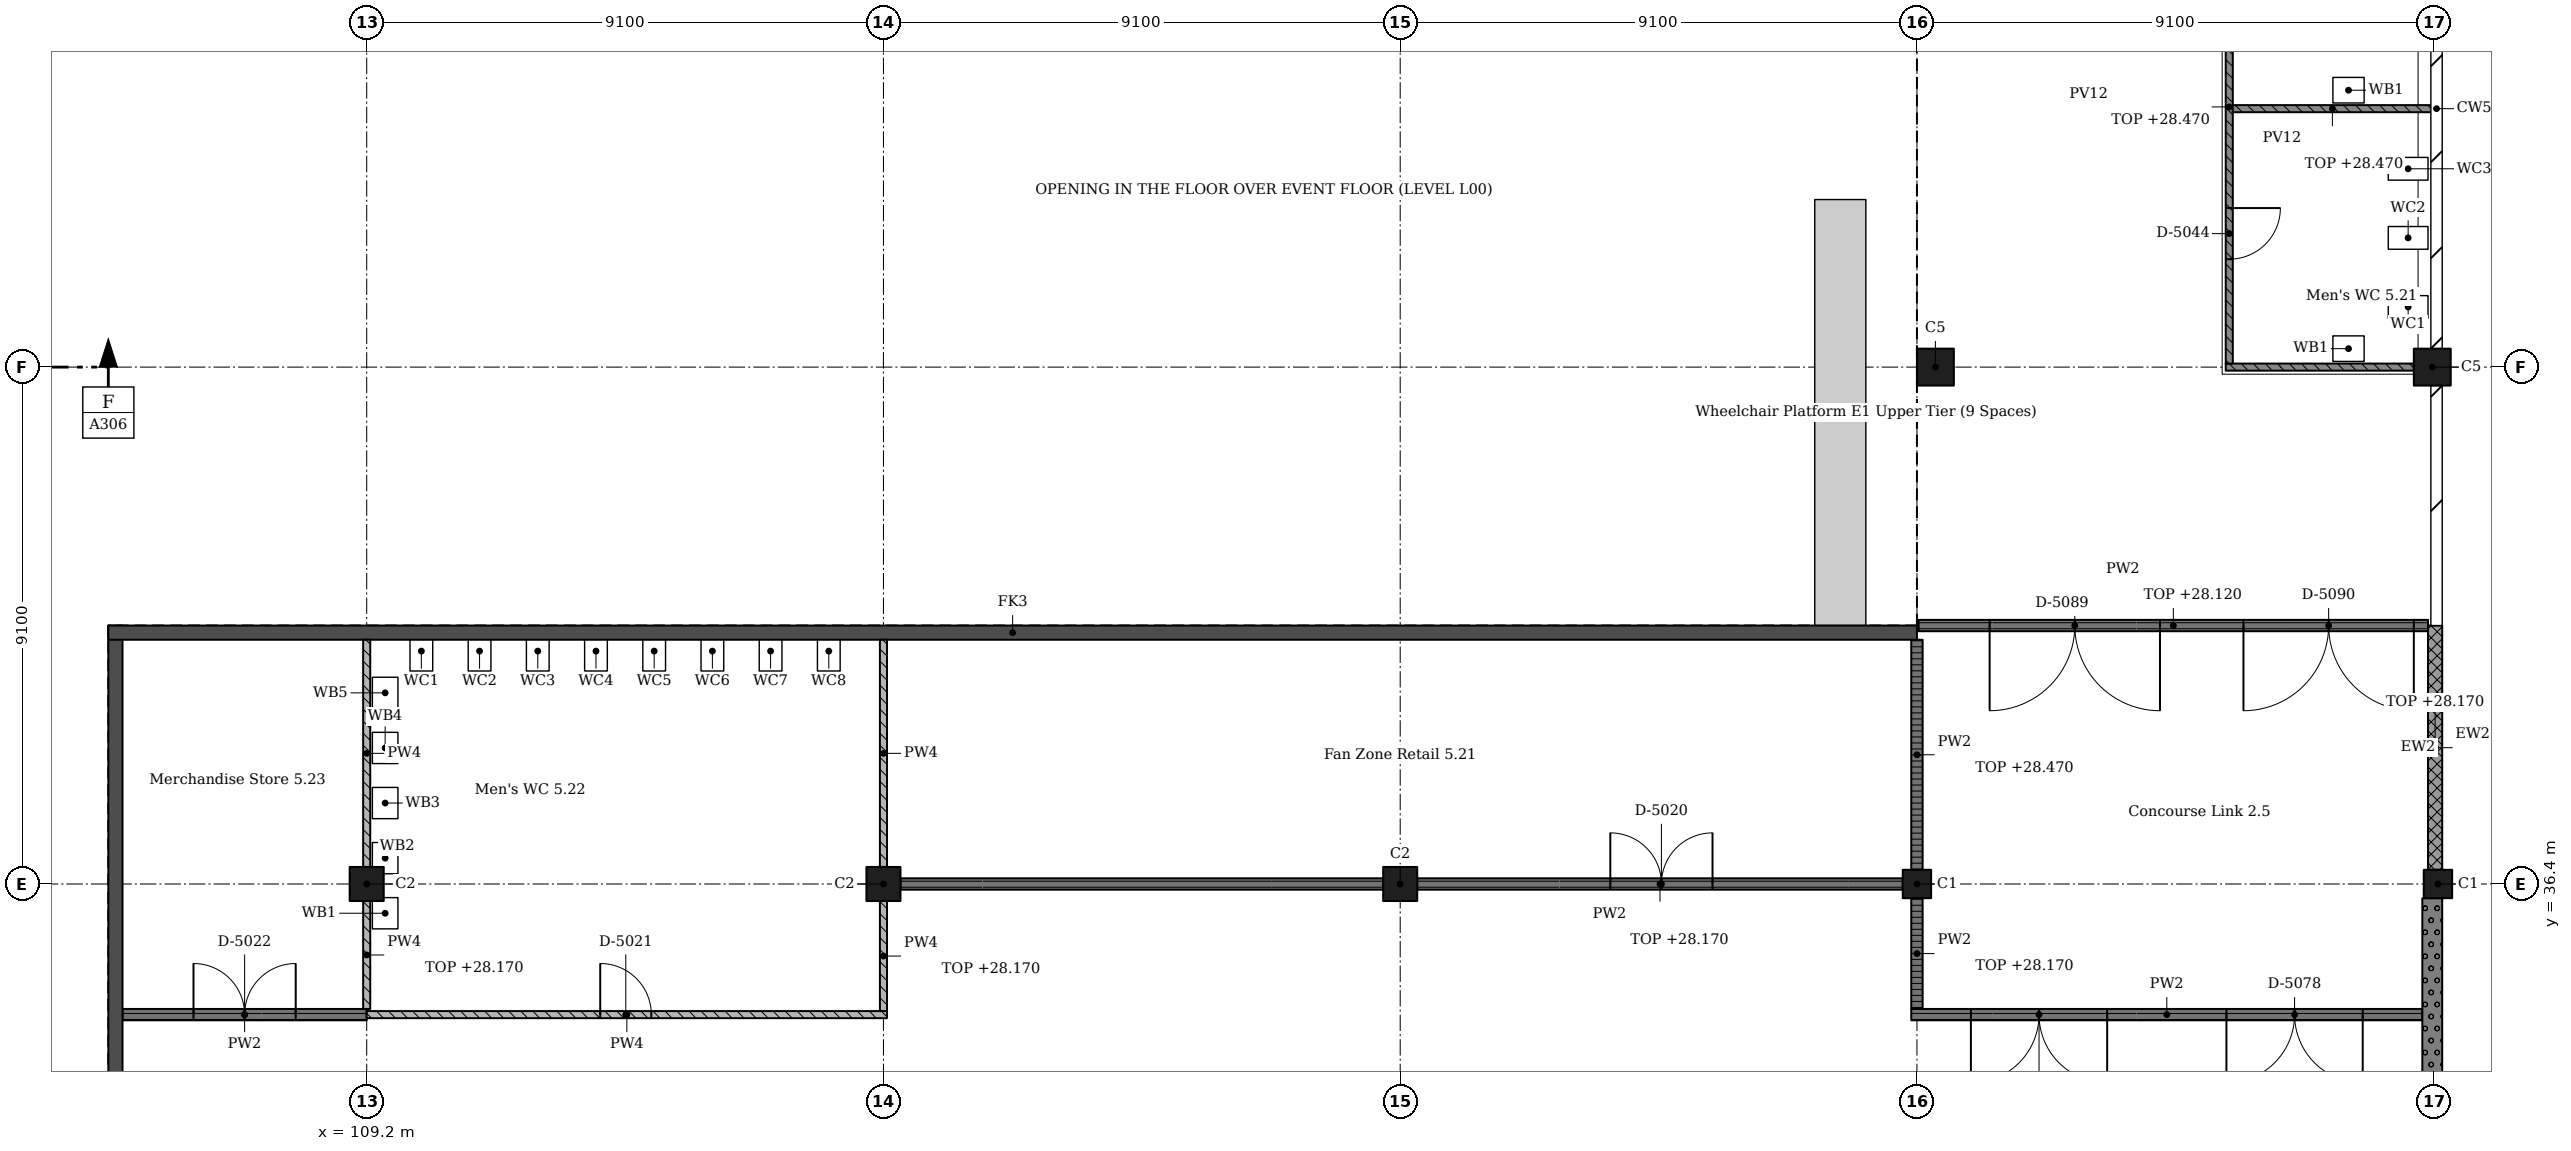
"""IFC4 building model, lengths in metres.
Left out: names, types, materials, properties, quantities, classifications, styles, units other than length and angle.
Written with IfcOpenShell. Run it as: python <this file> out.ifc"""

import sys

from ifc_helpers import new_model, si_unit, direction, frame, frame_2d, origin, origin_2d, place, context, subcontext, project, spatial, rectangle, extrude, element, fill, save


model = new_model("IFC4")
c1 = context("Model", 3, precision=1e-05, world=origin(), true_north=direction((0.0, 1.0)))
c2 = subcontext(c1, "Body", "Model", "MODEL_VIEW")
j1 = project(units=[si_unit("LENGTHUNIT", "METRE"), si_unit("PLANEANGLEUNIT", "RADIAN")], contexts=[c1])
p1 = place(None, origin())
s1 = spatial("IfcSite", under=j1, at=p1, CompositionType="ELEMENT")
p2 = place(p1, origin())
s2 = spatial("IfcBuilding", under=s1, at=p2, CompositionType="ELEMENT")
p3 = place(p2, frame((0.0, 0.0, 24.57)))
s3 = spatial("IfcBuildingStorey", under=s2, at=p3, CompositionType="ELEMENT", Elevation=24.57)
for number, where, z_axis, x_axis in (
    (1, (109.2, 36.4, 0.0), (0.0, 0.0, 1.0), (1.0, 0.0, 0.0)),
    (2, (118.3, 36.4, 0.0), (0.0, 0.0, 1.0), (1.0, 0.0, 0.0)),
    (3, (127.4, 36.4, 0.0), (0.0, 0.0, 1.0), (1.0, 0.0, 0.0)),
):
    element("IfcColumn", number, at=place(p3, frame(where, z_axis=z_axis, x_axis=x_axis)), inside=s3, PredefinedType="COLUMN", context=c2, shape_type="SweptSolid", body=[
        extrude(rectangle(XDim=0.6, YDim=0.6, at=origin_2d()), origin(), (0.0, 0.0, 1.0), 4.55),
    ])
p4 = place(p3, frame((136.5, 36.4, 0.0), z_axis=(0.0, 0.0, 1.0), x_axis=(1.0, 0.0, 0.0)))
e4 = element("IfcColumn", 4, at=p4, inside=s3, PredefinedType="COLUMN", context=c2, shape_type="SweptSolid", body=[
    extrude(rectangle(XDim=0.5, YDim=0.5, at=origin_2d()), origin(), (0.0, 0.0, 1.0), 4.55),
])
p5 = place(p3, frame((136.825, 45.5, 0.0), z_axis=(0.0, 0.0, 1.0), x_axis=(1.0, 0.0, 0.0)))
e5 = element("IfcColumn", 5, at=p5, inside=s3, PredefinedType="COLUMN", context=c2, shape_type="SweptSolid", body=[
    extrude(rectangle(XDim=0.65, YDim=0.65, at=origin_2d()), origin(), (0.0, 0.0, 1.0), 4.55),
])
p6 = place(p3, frame((145.675, 36.4, 0.0), z_axis=(0.0, 0.0, 1.0), x_axis=(1.0, 0.0, 0.0)))
e6 = element("IfcColumn", 6, at=p6, inside=s3, PredefinedType="COLUMN", context=c2, shape_type="SweptSolid", body=[
    extrude(rectangle(XDim=0.5, YDim=0.5, at=origin_2d()), origin(), (0.0, 0.0, 1.0), 4.55),
])
p7 = place(p3, frame((145.575, 45.5, 0.0), z_axis=(0.0, 0.0, 1.0), x_axis=(1.0, 0.0, 0.0)))
e7 = element("IfcColumn", 7, at=p7, inside=s3, PredefinedType="COLUMN", context=c2, shape_type="SweptSolid", body=[
    extrude(rectangle(XDim=0.65, YDim=0.65, at=origin_2d()), origin(), (0.0, 0.0, 1.0), 4.55),
])
p8 = place(p3, frame((104.775, 40.95, 0.0), z_axis=(0.0, 0.0, 1.0), x_axis=(0.0, -1.0, 0.0)))
e8 = element("IfcWall", 8, at=p8, inside=s3, PredefinedType="SHEAR", context=c2, shape_type="SweptSolid", body=[
    extrude(rectangle(XDim=31.85, YDim=0.25, at=frame_2d((15.925, 0.0))), origin(), (0.0, 0.0, 1.0), 4.55),
])
p9 = place(p3, frame((104.65, 40.825, 0.0), z_axis=(0.0, 0.0, 1.0), x_axis=(1.0, 0.0, 0.0)))
e9 = element("IfcWall", 9, at=p9, inside=s3, PredefinedType="SHEAR", context=c2, shape_type="SweptSolid", body=[
    extrude(rectangle(XDim=31.85, YDim=0.25, at=frame_2d((15.925, 0.0))), origin(), (0.0, 0.0, 1.0), 4.55),
])
p10 = place(p3, frame((145.575, 27.55, 0.0), z_axis=(0.0, 0.0, 1.0), x_axis=(0.0, 1.0, 0.0)))
e10 = element("IfcWall", 10, at=p10, inside=s3, PredefinedType="SOLIDWALL", context=c2, shape_type="SweptSolid", body=[
    extrude(rectangle(XDim=8.6, YDim=0.35, at=frame_2d((4.3, 0.0))), origin(), (0.0, 0.0, 1.0), 3.6),
])
p11 = place(p3, frame((145.625, 36.65, 0.0), z_axis=(0.0, 0.0, 1.0), x_axis=(0.0, 1.0, 0.0)))
e11 = element("IfcWall", 11, at=p11, inside=s3, PredefinedType="SOLIDWALL", context=c2, shape_type="SweptSolid", body=[
    extrude(rectangle(XDim=4.3, YDim=0.25, at=frame_2d((2.15, 0.0))), origin(), (0.0, 0.0, 1.0), 3.6),
])
p12 = place(p3, frame((109.2, 34.1, 0.0), z_axis=(0.0, 0.0, 1.0), x_axis=(-1.0, 0.0, 0.0)))
e12 = element("IfcWall", 12, at=p12, inside=s3, PredefinedType="PARTITIONING", context=c2, shape_type="SweptSolid", body=[
    extrude(rectangle(XDim=4.3, YDim=0.2, at=frame_2d((2.15, 0.0))), origin(), (0.0, 0.0, 1.0), 4.35),
])
p13 = place(p12, frame((1.25, 0.0, 0.0)))
e13 = element("IfcOpeningElement", 13, at=p13, cuts=e12, PredefinedType="OPENING", context=c2, shape_type="SweptSolid", body=[
    extrude(rectangle(XDim=1.8, YDim=2.1, at=frame_2d((0.9, 1.05))), frame((0.0, 0.11, 0.0), z_axis=(0.0, -1.0, 0.0), x_axis=(1.0, 0.0, 0.0)), (0.0, 0.0, 1.0), 0.22),
])
p14 = place(p3, frame((109.2, 34.2, 0.0), z_axis=(0.0, 0.0, 1.0), x_axis=(0.0, 1.0, 0.0)))
e14 = element("IfcWall", 14, at=p14, inside=s3, PredefinedType="PARTITIONING", context=c2, shape_type="SweptSolid", body=[
    extrude(rectangle(XDim=1.9, YDim=0.125, at=frame_2d((0.95, 0.0))), origin(), (0.0, 0.0, 1.0), 3.6),
])
p15 = place(p3, frame((109.2, 36.7, 0.0), z_axis=(0.0, 0.0, 1.0), x_axis=(0.0, 1.0, 0.0)))
e15 = element("IfcWall", 15, at=p15, inside=s3, PredefinedType="PARTITIONING", context=c2, shape_type="SweptSolid", body=[
    extrude(rectangle(XDim=4.0, YDim=0.125, at=frame_2d((2.0, 0.0))), origin(), (0.0, 0.0, 1.0), 4.35),
])
p16 = place(p3, frame((118.3, 36.1, 0.0), z_axis=(0.0, 0.0, 1.0), x_axis=(0.0, -1.0, 0.0)))
e16 = element("IfcWall", 16, at=p16, inside=s3, PredefinedType="PARTITIONING", context=c2, shape_type="SweptSolid", body=[
    extrude(rectangle(XDim=1.938, YDim=0.125, at=frame_2d((0.969, 0.0))), origin(), (0.0, 0.0, 1.0), 3.6),
])
p17 = place(p3, frame((118.3, 36.7, 0.0), z_axis=(0.0, 0.0, 1.0), x_axis=(0.0, 1.0, 0.0)))
e17 = element("IfcWall", 17, at=p17, inside=s3, PredefinedType="PARTITIONING", context=c2, shape_type="SweptSolid", body=[
    extrude(rectangle(XDim=4.0, YDim=0.125, at=frame_2d((2.0, 0.0))), origin(), (0.0, 0.0, 1.0), 4.35),
])
p18 = place(p3, frame((118.363, 34.1, 0.0), z_axis=(0.0, 0.0, 1.0), x_axis=(-1.0, 0.0, 0.0)))
e18 = element("IfcWall", 18, at=p18, inside=s3, PredefinedType="PARTITIONING", context=c2, shape_type="SweptSolid", body=[
    extrude(rectangle(XDim=9.163, YDim=0.125, at=frame_2d((4.581, 0.0))), origin(), (0.0, 0.0, 1.0), 4.35),
])
p19 = place(p18, frame((4.15, 0.0, 0.0)))
e19 = element("IfcOpeningElement", 19, at=p19, cuts=e18, PredefinedType="OPENING", context=c2, shape_type="SweptSolid", body=[
    extrude(rectangle(XDim=0.9, YDim=2.1, at=frame_2d((0.45, 1.05))), frame((0.0, 0.073, 0.0), z_axis=(0.0, -1.0, 0.0), x_axis=(1.0, 0.0, 0.0)), (0.0, 0.0, 1.0), 0.145),
])
p20 = place(p3, frame((127.1, 36.4, 0.0), z_axis=(0.0, 0.0, 1.0), x_axis=(-1.0, 0.0, 0.0)))
e20 = element("IfcWall", 20, at=p20, inside=s3, PredefinedType="PARTITIONING", context=c2, shape_type="SweptSolid", body=[
    extrude(rectangle(XDim=8.5, YDim=0.2, at=frame_2d((4.25, 0.0))), origin(), (0.0, 0.0, 1.0), 3.6),
])
p21 = place(p3, frame((136.25, 36.4, 0.0), z_axis=(0.0, 0.0, 1.0), x_axis=(-1.0, 0.0, 0.0)))
e21 = element("IfcWall", 21, at=p21, inside=s3, PredefinedType="PARTITIONING", context=c2, shape_type="SweptSolid", body=[
    extrude(rectangle(XDim=8.55, YDim=0.2, at=frame_2d((4.275, 0.0))), origin(), (0.0, 0.0, 1.0), 3.6),
])
p22 = place(p21, frame((3.35, 0.0, 0.0)))
e22 = element("IfcOpeningElement", 22, at=p22, cuts=e21, PredefinedType="OPENING", context=c2, shape_type="SweptSolid", body=[
    extrude(rectangle(XDim=1.8, YDim=2.1, at=frame_2d((0.9, 1.05))), frame((0.0, 0.11, 0.0), z_axis=(0.0, -1.0, 0.0), x_axis=(1.0, 0.0, 0.0)), (0.0, 0.0, 1.0), 0.22),
])
p23 = place(p3, frame((136.4, 34.1, 0.0), z_axis=(0.0, 0.0, 1.0), x_axis=(1.0, 0.0, 0.0)))
e23 = element("IfcWall", 23, at=p23, inside=s3, PredefinedType="PARTITIONING", context=c2, shape_type="SweptSolid", body=[
    extrude(rectangle(XDim=9.0, YDim=0.2, at=frame_2d((4.5, 0.0))), origin(), (0.0, 0.0, 1.0), 4.35),
])
p24 = place(p23, frame((1.05, 0.0, 0.0)))
e24 = element("IfcOpeningElement", 24, at=p24, cuts=e23, PredefinedType="OPENING", context=c2, shape_type="SweptSolid", body=[
    extrude(rectangle(XDim=2.4, YDim=2.4, at=frame_2d((1.2, 1.2))), frame((0.0, 0.11, 0.0), z_axis=(0.0, -1.0, 0.0), x_axis=(1.0, 0.0, 0.0)), (0.0, 0.0, 1.0), 0.22),
])
p25 = place(p23, frame((5.55, 0.0, 0.0)))
e25 = element("IfcOpeningElement", 25, at=p25, cuts=e23, PredefinedType="OPENING", context=c2, shape_type="SweptSolid", body=[
    extrude(rectangle(XDim=2.4, YDim=2.4, at=frame_2d((1.2, 1.2))), frame((0.0, 0.11, 0.0), z_axis=(0.0, -1.0, 0.0), x_axis=(1.0, 0.0, 0.0)), (0.0, 0.0, 1.0), 0.22),
])
p26 = place(p3, frame((136.5, 36.15, 0.0), z_axis=(0.0, 0.0, 1.0), x_axis=(0.0, -1.0, 0.0)))
e26 = element("IfcWall", 26, at=p26, inside=s3, PredefinedType="PARTITIONING", context=c2, shape_type="SweptSolid", body=[
    extrude(rectangle(XDim=1.95, YDim=0.2, at=frame_2d((0.975, 0.0))), origin(), (0.0, 0.0, 1.0), 3.6),
])
p27 = place(p3, frame((136.5, 40.7, 0.0), z_axis=(0.0, 0.0, 1.0), x_axis=(0.0, -1.0, 0.0)))
e27 = element("IfcWall", 27, at=p27, inside=s3, PredefinedType="PARTITIONING", context=c2, shape_type="SweptSolid", body=[
    extrude(rectangle(XDim=4.05, YDim=0.2, at=frame_2d((2.025, 0.0))), origin(), (0.0, 0.0, 1.0), 3.9),
])
p28 = place(p3, frame((136.53, 40.95, 0.0), z_axis=(0.0, 0.0, 1.0), x_axis=(1.0, 0.0, 0.0)))
e28 = element("IfcWall", 28, at=p28, inside=s3, PredefinedType="PARTITIONING", context=c2, shape_type="SweptSolid", body=[
    extrude(rectangle(XDim=8.97, YDim=0.2, at=frame_2d((4.485, 0.0))), origin(), (0.0, 0.0, 1.0), 3.55),
])
p29 = place(p28, frame((1.25, 0.0, 0.0)))
e29 = element("IfcOpeningElement", 29, at=p29, cuts=e28, PredefinedType="OPENING", context=c2, shape_type="SweptSolid", body=[
    extrude(rectangle(XDim=3.0, YDim=2.4, at=frame_2d((1.5, 1.2))), frame((0.0, 0.11, 0.0), z_axis=(0.0, -1.0, 0.0), x_axis=(1.0, 0.0, 0.0)), (0.0, 0.0, 1.0), 0.22),
])
p30 = place(p28, frame((5.72, 0.0, 0.0)))
e30 = element("IfcOpeningElement", 30, at=p30, cuts=e28, PredefinedType="OPENING", context=c2, shape_type="SweptSolid", body=[
    extrude(rectangle(XDim=3.0, YDim=2.4, at=frame_2d((1.5, 1.2))), frame((0.0, 0.11, 0.0), z_axis=(0.0, -1.0, 0.0), x_axis=(1.0, 0.0, 0.0)), (0.0, 0.0, 1.0), 0.22),
])
p31 = place(p3, frame((141.938, 45.5, 0.0), z_axis=(0.0, 0.0, 1.0), x_axis=(1.0, 0.0, 0.0)))
e31 = element("IfcWall", 31, at=p31, inside=s3, PredefinedType="PARTITIONING", context=c2, shape_type="SweptSolid", body=[
    extrude(rectangle(XDim=3.312, YDim=0.125, at=frame_2d((1.656, 0.0))), origin(), (0.0, 0.0, 1.0), 3.9),
])
p32 = place(p3, frame((142.0, 45.562, 0.0), z_axis=(0.0, 0.0, 1.0), x_axis=(0.0, 1.0, 0.0)))
e32 = element("IfcWall", 32, at=p32, inside=s3, PredefinedType="PARTITIONING", context=c2, shape_type="SweptSolid", body=[
    extrude(rectangle(XDim=9.038, YDim=0.125, at=frame_2d((4.519, 0.0))), origin(), (0.0, 0.0, 1.0), 3.9),
])
p33 = place(p32, frame((1.837, 0.0, 0.0)))
e33 = element("IfcOpeningElement", 33, at=p33, cuts=e32, PredefinedType="OPENING", context=c2, shape_type="SweptSolid", body=[
    extrude(rectangle(XDim=0.9, YDim=2.1, at=frame_2d((0.45, 1.05))), frame((0.0, 0.073, 0.0), z_axis=(0.0, -1.0, 0.0), x_axis=(1.0, 0.0, 0.0)), (0.0, 0.0, 1.0), 0.145),
])
p34 = place(p32, frame((6.288, 0.0, 0.0)))
e34 = element("IfcOpeningElement", 34, at=p34, cuts=e32, PredefinedType="OPENING", context=c2, shape_type="SweptSolid", body=[
    extrude(rectangle(XDim=1.0, YDim=2.1, at=frame_2d((0.5, 1.05))), frame((0.0, 0.073, 0.0), z_axis=(0.0, -1.0, 0.0), x_axis=(1.0, 0.0, 0.0)), (0.0, 0.0, 1.0), 0.145),
])
p35 = place(p3, frame((142.062, 50.05, 0.0), z_axis=(0.0, 0.0, 1.0), x_axis=(1.0, 0.0, 0.0)))
e35 = element("IfcWall", 35, at=p35, inside=s3, PredefinedType="PARTITIONING", context=c2, shape_type="SweptSolid", body=[
    extrude(rectangle(XDim=3.508, YDim=0.125, at=frame_2d((1.754, 0.0))), origin(), (0.0, 0.0, 1.0), 3.9),
])
p36 = place(p22, origin())
e36 = element("IfcDoor", 36, at=p36, inside=s3, OperationType="DOUBLE_DOOR_SINGLE_SWING", PredefinedType="DOOR", context=c2, shape_type="SweptSolid", body=[
    extrude(rectangle(XDim=1.8, YDim=2.1, at=frame_2d((0.9, 1.05))), frame((0.0, 0.025, 0.0), z_axis=(0.0, -1.0, 0.0), x_axis=(1.0, 0.0, 0.0)), (0.0, 0.0, 1.0), 0.05),
])
fill(e22, e36)
p37 = place(p19, origin())
e37 = element("IfcDoor", 37, at=p37, inside=s3, OperationType="SINGLE_SWING_RIGHT", PredefinedType="DOOR", context=c2, shape_type="SweptSolid", body=[
    extrude(rectangle(XDim=0.9, YDim=2.1, at=frame_2d((0.45, 1.05))), frame((0.0, 0.025, 0.0), z_axis=(0.0, -1.0, 0.0), x_axis=(1.0, 0.0, 0.0)), (0.0, 0.0, 1.0), 0.05),
])
fill(e19, e37)
p38 = place(p13, origin())
e38 = element("IfcDoor", 38, at=p38, inside=s3, OperationType="DOUBLE_DOOR_SINGLE_SWING", PredefinedType="DOOR", context=c2, shape_type="SweptSolid", body=[
    extrude(rectangle(XDim=1.8, YDim=2.1, at=frame_2d((0.9, 1.05))), frame((0.0, 0.025, 0.0), z_axis=(0.0, -1.0, 0.0), x_axis=(1.0, 0.0, 0.0)), (0.0, 0.0, 1.0), 0.05),
])
fill(e13, e38)
p39 = place(p33, origin())
e39 = element("IfcDoor", 39, at=p39, inside=s3, OperationType="SINGLE_SWING_RIGHT", PredefinedType="DOOR", context=c2, shape_type="SweptSolid", body=[
    extrude(rectangle(XDim=0.9, YDim=2.1, at=frame_2d((0.45, 1.05))), frame((0.0, 0.025, 0.0), z_axis=(0.0, -1.0, 0.0), x_axis=(1.0, 0.0, 0.0)), (0.0, 0.0, 1.0), 0.05),
])
fill(e33, e39)
p40 = place(p24, origin())
e40 = element("IfcDoor", 40, at=p40, inside=s3, OperationType="DOUBLE_DOOR_SINGLE_SWING", PredefinedType="DOOR", context=c2, shape_type="SweptSolid", body=[
    extrude(rectangle(XDim=2.4, YDim=2.4, at=frame_2d((1.2, 1.2))), frame((0.0, 0.025, 0.0), z_axis=(0.0, -1.0, 0.0), x_axis=(1.0, 0.0, 0.0)), (0.0, 0.0, 1.0), 0.05),
])
fill(e24, e40)
p41 = place(p25, origin())
e41 = element("IfcDoor", 41, at=p41, inside=s3, OperationType="DOUBLE_DOOR_SINGLE_SWING", PredefinedType="DOOR", context=c2, shape_type="SweptSolid", body=[
    extrude(rectangle(XDim=2.4, YDim=2.4, at=frame_2d((1.2, 1.2))), frame((0.0, 0.025, 0.0), z_axis=(0.0, -1.0, 0.0), x_axis=(1.0, 0.0, 0.0)), (0.0, 0.0, 1.0), 0.05),
])
fill(e25, e41)
p42 = place(p29, origin())
e42 = element("IfcDoor", 42, at=p42, inside=s3, OperationType="DOUBLE_DOOR_SINGLE_SWING", PredefinedType="DOOR", context=c2, shape_type="SweptSolid", body=[
    extrude(rectangle(XDim=3.0, YDim=2.4, at=frame_2d((1.5, 1.2))), frame((0.0, 0.025, 0.0), z_axis=(0.0, -1.0, 0.0), x_axis=(1.0, 0.0, 0.0)), (0.0, 0.0, 1.0), 0.05),
])
fill(e29, e42)
p43 = place(p30, origin())
e43 = element("IfcDoor", 43, at=p43, inside=s3, OperationType="DOUBLE_DOOR_SINGLE_SWING", PredefinedType="DOOR", context=c2, shape_type="SweptSolid", body=[
    extrude(rectangle(XDim=3.0, YDim=2.4, at=frame_2d((1.5, 1.2))), frame((0.0, 0.025, 0.0), z_axis=(0.0, -1.0, 0.0), x_axis=(1.0, 0.0, 0.0)), (0.0, 0.0, 1.0), 0.05),
])
fill(e30, e43)
save(model, sys.argv[1])
